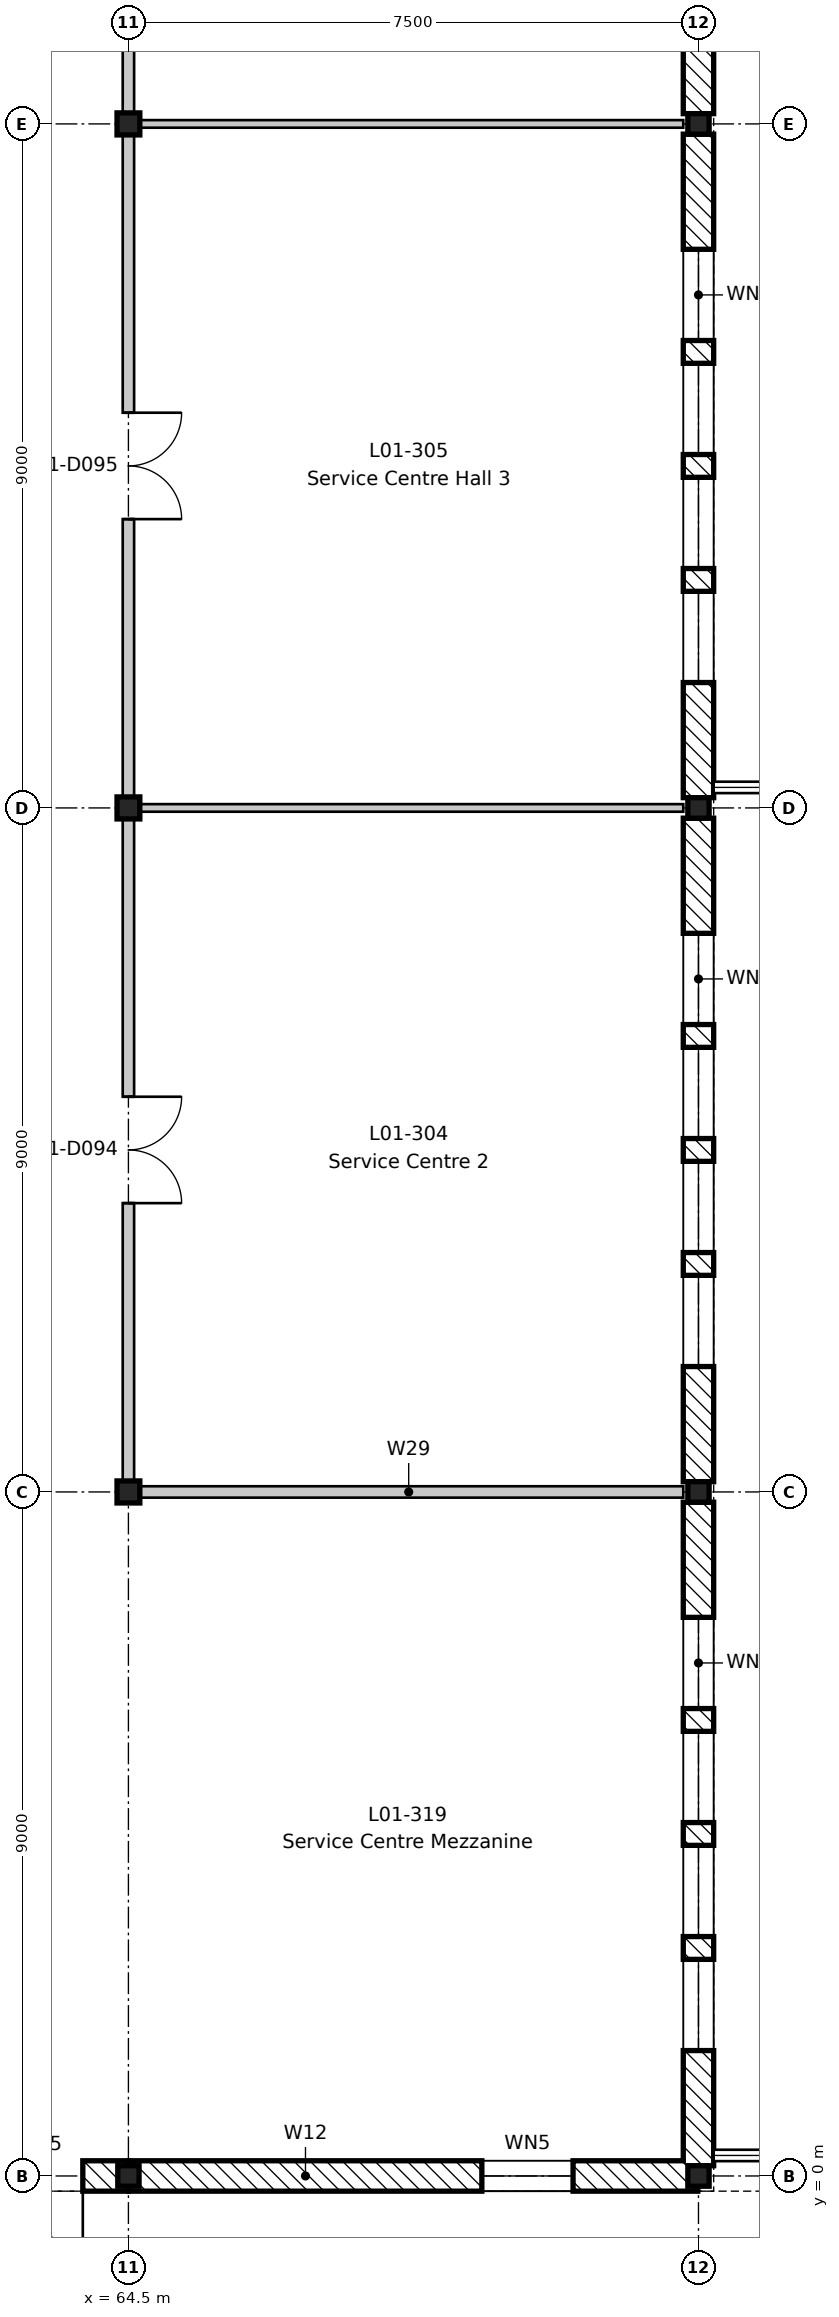
"""IFC4 building model, lengths in metres.
Left out: names, types, materials, properties, quantities, classifications, styles, units other than length and angle.
Written with IfcOpenShell. Run it as: python <this file> out.ifc"""

import sys

from ifc_helpers import new_model, si_unit, direction, frame, frame_2d, origin, origin_2d, place, context, subcontext, project, spatial, rectangle, i_section, extrude, element, fill, save


model = new_model("IFC4")
c1 = context("Model", 3, precision=1e-05, world=origin(), true_north=direction((0.0, 1.0)))
c2 = subcontext(c1, "Body", "Model", "MODEL_VIEW")
j1 = project(units=[si_unit("LENGTHUNIT", "METRE"), si_unit("PLANEANGLEUNIT", "RADIAN")], contexts=[c1])
p1 = place(None, origin())
s1 = spatial("IfcSite", under=j1, at=p1, CompositionType="ELEMENT")
p2 = place(p1, origin())
s2 = spatial("IfcBuilding", under=s1, at=p2, CompositionType="ELEMENT")
p3 = place(p2, frame((0.0, 0.0, 5.4)))
s3 = spatial("IfcBuildingStorey", under=s2, at=p3, CompositionType="ELEMENT", Elevation=5.4)
p4 = place(p3, frame((64.5, 0.0, -0.2), z_axis=(0.0, 0.0, 1.0), x_axis=(1.0, 0.0, 0.0)))
e1 = element("IfcColumn", 1, at=p4, inside=s3, PredefinedType="COLUMN", context=c2, shape_type="SweptSolid", body=[
    extrude(i_section(OverallWidth=0.28, OverallDepth=0.27, WebThickness=0.008, FlangeThickness=0.013, FilletRadius=0.024, at=origin_2d()), origin(), (0.0, 0.0, 1.0), 4.5),
])
for number, where, z_axis, x_axis in (
    (2, (64.5, 9.0, -0.2), (0.0, 0.0, 1.0), (1.0, 0.0, 0.0)),
    (3, (64.5, 18.0, -0.2), (0.0, 0.0, 1.0), (1.0, 0.0, 0.0)),
    (4, (64.5, 27.0, -0.2), (0.0, 0.0, 1.0), (1.0, 0.0, 0.0)),
):
    element("IfcColumn", number, at=place(p3, frame(where, z_axis=z_axis, x_axis=x_axis)), inside=s3, PredefinedType="COLUMN", context=c2, shape_type="SweptSolid", body=[
        extrude(i_section(OverallWidth=0.3, OverallDepth=0.29, WebThickness=0.009, FlangeThickness=0.014, FilletRadius=0.027, at=origin_2d()), origin(), (0.0, 0.0, 1.0), 4.5),
    ])
for number, where, z_axis, x_axis in (
    (5, (72.0, 0.0, -0.2), (0.0, 0.0, 1.0), (1.0, 0.0, 0.0)),
    (6, (72.0, 9.0, -0.2), (0.0, 0.0, 1.0), (1.0, 0.0, 0.0)),
    (7, (72.0, 18.0, -0.2), (0.0, 0.0, 1.0), (1.0, 0.0, 0.0)),
    (8, (72.0, 27.0, -0.2), (0.0, 0.0, 1.0), (1.0, 0.0, 0.0)),
):
    element("IfcColumn", number, at=place(p3, frame(where, z_axis=z_axis, x_axis=x_axis)), inside=s3, PredefinedType="COLUMN", context=c2, shape_type="SweptSolid", body=[
        extrude(i_section(OverallWidth=0.28, OverallDepth=0.27, WebThickness=0.008, FlangeThickness=0.013, FilletRadius=0.024, at=origin_2d()), origin(), (0.0, 0.0, 1.0), 4.5),
    ])
p5 = place(p3, frame((72.0, 8.865, 0.0), z_axis=(0.0, 0.0, 1.0), x_axis=(0.0, -1.0, 0.0)))
e9 = element("IfcWall", 9, at=p5, inside=s3, PredefinedType="STANDARD", context=c2, shape_type="SweptSolid", body=[
    extrude(rectangle(XDim=8.73, YDim=0.4, at=frame_2d((4.365, 0.0))), origin(), (0.0, 0.0, 1.0), 3.9),
])
p6 = place(p5, frame((6.015, 0.0, 0.6)))
e10 = element("IfcOpeningElement", 10, at=p6, cuts=e9, PredefinedType="OPENING", context=c2, shape_type="SweptSolid", body=[
    extrude(rectangle(XDim=1.2, YDim=3.0, at=frame_2d((0.6, 1.5))), frame((0.0, 0.21, 0.0), z_axis=(0.0, -1.0, 0.0), x_axis=(1.0, 0.0, 0.0)), (0.0, 0.0, 1.0), 0.42),
])
p7 = place(p5, frame((4.515, 0.0, 0.6)))
e11 = element("IfcOpeningElement", 11, at=p7, cuts=e9, PredefinedType="OPENING", context=c2, shape_type="SweptSolid", body=[
    extrude(rectangle(XDim=1.2, YDim=3.0, at=frame_2d((0.6, 1.5))), frame((0.0, 0.21, 0.0), z_axis=(0.0, -1.0, 0.0), x_axis=(1.0, 0.0, 0.0)), (0.0, 0.0, 1.0), 0.42),
])
p8 = place(p5, frame((3.015, 0.0, 0.6)))
e12 = element("IfcOpeningElement", 12, at=p8, cuts=e9, PredefinedType="OPENING", context=c2, shape_type="SweptSolid", body=[
    extrude(rectangle(XDim=1.2, YDim=3.0, at=frame_2d((0.6, 1.5))), frame((0.0, 0.21, 0.0), z_axis=(0.0, -1.0, 0.0), x_axis=(1.0, 0.0, 0.0)), (0.0, 0.0, 1.0), 0.42),
])
p9 = place(p5, frame((1.515, 0.0, 0.6)))
e13 = element("IfcOpeningElement", 13, at=p9, cuts=e9, PredefinedType="OPENING", context=c2, shape_type="SweptSolid", body=[
    extrude(rectangle(XDim=1.2, YDim=3.0, at=frame_2d((0.6, 1.5))), frame((0.0, 0.21, 0.0), z_axis=(0.0, -1.0, 0.0), x_axis=(1.0, 0.0, 0.0)), (0.0, 0.0, 1.0), 0.42),
])
p10 = place(p3, frame((72.0, 17.865, 0.0), z_axis=(0.0, 0.0, 1.0), x_axis=(0.0, -1.0, 0.0)))
e14 = element("IfcWall", 14, at=p10, inside=s3, PredefinedType="STANDARD", context=c2, shape_type="SweptSolid", body=[
    extrude(rectangle(XDim=8.73, YDim=0.4, at=frame_2d((4.365, 0.0))), origin(), (0.0, 0.0, 1.0), 3.9),
])
p11 = place(p10, frame((6.015, 0.0, 0.6)))
e15 = element("IfcOpeningElement", 15, at=p11, cuts=e14, PredefinedType="OPENING", context=c2, shape_type="SweptSolid", body=[
    extrude(rectangle(XDim=1.2, YDim=3.0, at=frame_2d((0.6, 1.5))), frame((0.0, 0.21, 0.0), z_axis=(0.0, -1.0, 0.0), x_axis=(1.0, 0.0, 0.0)), (0.0, 0.0, 1.0), 0.42),
])
p12 = place(p10, frame((4.515, 0.0, 0.6)))
e16 = element("IfcOpeningElement", 16, at=p12, cuts=e14, PredefinedType="OPENING", context=c2, shape_type="SweptSolid", body=[
    extrude(rectangle(XDim=1.2, YDim=3.0, at=frame_2d((0.6, 1.5))), frame((0.0, 0.21, 0.0), z_axis=(0.0, -1.0, 0.0), x_axis=(1.0, 0.0, 0.0)), (0.0, 0.0, 1.0), 0.42),
])
p13 = place(p10, frame((3.015, 0.0, 0.6)))
e17 = element("IfcOpeningElement", 17, at=p13, cuts=e14, PredefinedType="OPENING", context=c2, shape_type="SweptSolid", body=[
    extrude(rectangle(XDim=1.2, YDim=3.0, at=frame_2d((0.6, 1.5))), frame((0.0, 0.21, 0.0), z_axis=(0.0, -1.0, 0.0), x_axis=(1.0, 0.0, 0.0)), (0.0, 0.0, 1.0), 0.42),
])
p14 = place(p10, frame((1.515, 0.0, 0.6)))
e18 = element("IfcOpeningElement", 18, at=p14, cuts=e14, PredefinedType="OPENING", context=c2, shape_type="SweptSolid", body=[
    extrude(rectangle(XDim=1.2, YDim=3.0, at=frame_2d((0.6, 1.5))), frame((0.0, 0.21, 0.0), z_axis=(0.0, -1.0, 0.0), x_axis=(1.0, 0.0, 0.0)), (0.0, 0.0, 1.0), 0.42),
])
p15 = place(p3, frame((72.0, 26.865, 0.0), z_axis=(0.0, 0.0, 1.0), x_axis=(0.0, -1.0, 0.0)))
e19 = element("IfcWall", 19, at=p15, inside=s3, PredefinedType="STANDARD", context=c2, shape_type="SweptSolid", body=[
    extrude(rectangle(XDim=8.73, YDim=0.4, at=frame_2d((4.365, 0.0))), origin(), (0.0, 0.0, 1.0), 3.9),
])
p16 = place(p15, frame((6.015, 0.0, 0.6)))
e20 = element("IfcOpeningElement", 20, at=p16, cuts=e19, PredefinedType="OPENING", context=c2, shape_type="SweptSolid", body=[
    extrude(rectangle(XDim=1.2, YDim=3.0, at=frame_2d((0.6, 1.5))), frame((0.0, 0.21, 0.0), z_axis=(0.0, -1.0, 0.0), x_axis=(1.0, 0.0, 0.0)), (0.0, 0.0, 1.0), 0.42),
])
p17 = place(p15, frame((4.515, 0.0, 0.6)))
e21 = element("IfcOpeningElement", 21, at=p17, cuts=e19, PredefinedType="OPENING", context=c2, shape_type="SweptSolid", body=[
    extrude(rectangle(XDim=1.2, YDim=3.0, at=frame_2d((0.6, 1.5))), frame((0.0, 0.21, 0.0), z_axis=(0.0, -1.0, 0.0), x_axis=(1.0, 0.0, 0.0)), (0.0, 0.0, 1.0), 0.42),
])
p18 = place(p15, frame((3.015, 0.0, 0.6)))
e22 = element("IfcOpeningElement", 22, at=p18, cuts=e19, PredefinedType="OPENING", context=c2, shape_type="SweptSolid", body=[
    extrude(rectangle(XDim=1.2, YDim=3.0, at=frame_2d((0.6, 1.5))), frame((0.0, 0.21, 0.0), z_axis=(0.0, -1.0, 0.0), x_axis=(1.0, 0.0, 0.0)), (0.0, 0.0, 1.0), 0.42),
])
p19 = place(p15, frame((1.515, 0.0, 0.6)))
e23 = element("IfcOpeningElement", 23, at=p19, cuts=e19, PredefinedType="OPENING", context=c2, shape_type="SweptSolid", body=[
    extrude(rectangle(XDim=1.2, YDim=3.0, at=frame_2d((0.6, 1.5))), frame((0.0, 0.21, 0.0), z_axis=(0.0, -1.0, 0.0), x_axis=(1.0, 0.0, 0.0)), (0.0, 0.0, 1.0), 0.42),
])
p20 = place(p3, frame((72.0, 35.865, 0.0), z_axis=(0.0, 0.0, 1.0), x_axis=(0.0, -1.0, 0.0)))
e24 = element("IfcWall", 24, at=p20, inside=s3, PredefinedType="STANDARD", context=c2, shape_type="SweptSolid", body=[
    extrude(rectangle(XDim=8.73, YDim=0.4, at=frame_2d((4.365, 0.0))), origin(), (0.0, 0.0, 1.0), 3.9),
])
p21 = place(p20, frame((6.015, 0.0, 0.6)))
e25 = element("IfcOpeningElement", 25, at=p21, cuts=e24, PredefinedType="OPENING", context=c2, shape_type="SweptSolid", body=[
    extrude(rectangle(XDim=1.2, YDim=3.0, at=frame_2d((0.6, 1.5))), frame((0.0, 0.21, 0.0), z_axis=(0.0, -1.0, 0.0), x_axis=(1.0, 0.0, 0.0)), (0.0, 0.0, 1.0), 0.42),
])
p22 = place(p20, frame((4.515, 0.0, 0.6)))
e26 = element("IfcOpeningElement", 26, at=p22, cuts=e24, PredefinedType="OPENING", context=c2, shape_type="SweptSolid", body=[
    extrude(rectangle(XDim=1.2, YDim=3.0, at=frame_2d((0.6, 1.5))), frame((0.0, 0.21, 0.0), z_axis=(0.0, -1.0, 0.0), x_axis=(1.0, 0.0, 0.0)), (0.0, 0.0, 1.0), 0.42),
])
p23 = place(p20, frame((3.015, 0.0, 0.6)))
e27 = element("IfcOpeningElement", 27, at=p23, cuts=e24, PredefinedType="OPENING", context=c2, shape_type="SweptSolid", body=[
    extrude(rectangle(XDim=1.2, YDim=3.0, at=frame_2d((0.6, 1.5))), frame((0.0, 0.21, 0.0), z_axis=(0.0, -1.0, 0.0), x_axis=(1.0, 0.0, 0.0)), (0.0, 0.0, 1.0), 0.42),
])
p24 = place(p20, frame((1.515, 0.0, 0.6)))
e28 = element("IfcOpeningElement", 28, at=p24, cuts=e24, PredefinedType="OPENING", context=c2, shape_type="SweptSolid", body=[
    extrude(rectangle(XDim=1.2, YDim=3.0, at=frame_2d((0.6, 1.5))), frame((0.0, 0.21, 0.0), z_axis=(0.0, -1.0, 0.0), x_axis=(1.0, 0.0, 0.0)), (0.0, 0.0, 1.0), 0.42),
])
p25 = place(p3, frame((64.491, 0.0, 0.0), z_axis=(0.0, 0.0, 1.0), x_axis=(-1.0, 0.0, 0.0)))
e29 = element("IfcWall", 29, at=p25, inside=s3, PredefinedType="STANDARD", context=c2, shape_type="SweptSolid", body=[
    extrude(rectangle(XDim=2.982, YDim=0.4, at=frame_2d((1.491, 0.0))), origin(), (0.0, 0.0, 1.0), 4.1),
])
p26 = place(p25, frame((0.591, 0.0, 0.0)))
e30 = element("IfcOpeningElement", 30, at=p26, cuts=e29, PredefinedType="OPENING", context=c2, shape_type="SweptSolid", body=[
    extrude(rectangle(XDim=1.8, YDim=2.4, at=frame_2d((0.9, 1.2))), frame((0.0, 0.21, 0.0), z_axis=(0.0, -1.0, 0.0), x_axis=(1.0, 0.0, 0.0)), (0.0, 0.0, 1.0), 0.42),
])
p27 = place(p3, frame((71.991, 0.0, 0.0), z_axis=(0.0, 0.0, 1.0), x_axis=(-1.0, 0.0, 0.0)))
e31 = element("IfcWall", 31, at=p27, inside=s3, PredefinedType="STANDARD", context=c2, shape_type="SweptSolid", body=[
    extrude(rectangle(XDim=7.482, YDim=0.4, at=frame_2d((3.741, 0.0))), origin(), (0.0, 0.0, 1.0), 3.97),
])
p28 = place(p27, frame((1.641, 0.0, 0.6)))
e32 = element("IfcOpeningElement", 32, at=p28, cuts=e31, PredefinedType="OPENING", context=c2, shape_type="SweptSolid", body=[
    extrude(rectangle(XDim=1.2, YDim=3.0, at=frame_2d((0.6, 1.5))), frame((0.0, 0.21, 0.0), z_axis=(0.0, -1.0, 0.0), x_axis=(1.0, 0.0, 0.0)), (0.0, 0.0, 1.0), 0.42),
])
p29 = place(p3, frame((64.575, 9.0, 0.0), z_axis=(0.0, 0.0, 1.0), x_axis=(1.0, 0.0, 0.0)))
e33 = element("IfcWall", 33, at=p29, inside=s3, PredefinedType="PARTITIONING", context=c2, shape_type="SweptSolid", body=[
    extrude(rectangle(XDim=7.225, YDim=0.15, at=frame_2d((3.613, 0.0))), origin(), (0.0, 0.0, 1.0), 3.95),
])
for number, where, z_axis, x_axis in (
    (34, (64.575, 18.0, 0.0), (0.0, 0.0, 1.0), (1.0, 0.0, 0.0)),
    (35, (64.575, 27.0, 0.0), (0.0, 0.0, 1.0), (1.0, 0.0, 0.0)),
):
    element("IfcWall", number, at=place(p3, frame(where, z_axis=z_axis, x_axis=x_axis)), inside=s3, PredefinedType="PARTITIONING", context=c2, shape_type="SweptSolid", body=[
        extrude(rectangle(XDim=7.225, YDim=0.1, at=frame_2d((3.613, 0.0))), origin(), (0.0, 0.0, 1.0), 3.95),
    ])
p30 = place(p3, frame((64.5, 9.0, 0.0), z_axis=(0.0, 0.0, 1.0), x_axis=(0.0, 1.0, 0.0)))
e36 = element("IfcWall", 36, at=p30, inside=s3, PredefinedType="PARTITIONING", context=c2, shape_type="SweptSolid", body=[
    extrude(rectangle(XDim=44.8, YDim=0.15, at=frame_2d((22.4, 0.0))), origin(), (0.0, 0.0, 1.0), 3.78),
])
p31 = place(p30, frame((3.8, 0.0, 0.0)))
e37 = element("IfcOpeningElement", 37, at=p31, cuts=e36, PredefinedType="OPENING", context=c2, shape_type="SweptSolid", body=[
    extrude(rectangle(XDim=1.4, YDim=2.1, at=frame_2d((0.7, 1.05))), frame((0.0, 0.085, 0.0), z_axis=(0.0, -1.0, 0.0), x_axis=(1.0, 0.0, 0.0)), (0.0, 0.0, 1.0), 0.17),
])
p32 = place(p30, frame((12.8, 0.0, 0.0)))
e38 = element("IfcOpeningElement", 38, at=p32, cuts=e36, PredefinedType="OPENING", context=c2, shape_type="SweptSolid", body=[
    extrude(rectangle(XDim=1.4, YDim=2.1, at=frame_2d((0.7, 1.05))), frame((0.0, 0.085, 0.0), z_axis=(0.0, -1.0, 0.0), x_axis=(1.0, 0.0, 0.0)), (0.0, 0.0, 1.0), 0.17),
])
p33 = place(p30, frame((21.8, 0.0, 0.0)))
e39 = element("IfcOpeningElement", 39, at=p33, cuts=e36, PredefinedType="OPENING", context=c2, shape_type="SweptSolid", body=[
    extrude(rectangle(XDim=1.4, YDim=2.1, at=frame_2d((0.7, 1.05))), frame((0.0, 0.085, 0.0), z_axis=(0.0, -1.0, 0.0), x_axis=(1.0, 0.0, 0.0)), (0.0, 0.0, 1.0), 0.17),
])
p34 = place(p30, frame((30.8, 0.0, 0.0)))
e40 = element("IfcOpeningElement", 40, at=p34, cuts=e36, PredefinedType="OPENING", context=c2, shape_type="SweptSolid", body=[
    extrude(rectangle(XDim=1.4, YDim=2.1, at=frame_2d((0.7, 1.05))), frame((0.0, 0.085, 0.0), z_axis=(0.0, -1.0, 0.0), x_axis=(1.0, 0.0, 0.0)), (0.0, 0.0, 1.0), 0.17),
])
p35 = place(p30, frame((39.8, 0.0, 0.0)))
e41 = element("IfcOpeningElement", 41, at=p35, cuts=e36, PredefinedType="OPENING", context=c2, shape_type="SweptSolid", body=[
    extrude(rectangle(XDim=1.4, YDim=2.1, at=frame_2d((0.7, 1.05))), frame((0.0, 0.085, 0.0), z_axis=(0.0, -1.0, 0.0), x_axis=(1.0, 0.0, 0.0)), (0.0, 0.0, 1.0), 0.17),
])
p36 = place(p6, origin())
e42 = element("IfcWindow", 42, at=p36, inside=s3, PartitioningType="SINGLE_PANEL", PredefinedType="WINDOW", context=c2, shape_type="SweptSolid", body=[
    extrude(rectangle(XDim=1.2, YDim=3.0, at=frame_2d((0.6, 1.5))), frame((0.0, 0.03, 0.0), z_axis=(0.0, -1.0, 0.0), x_axis=(1.0, 0.0, 0.0)), (0.0, 0.0, 1.0), 0.06),
])
fill(e10, e42)
p37 = place(p7, origin())
e43 = element("IfcWindow", 43, at=p37, inside=s3, PartitioningType="SINGLE_PANEL", PredefinedType="WINDOW", context=c2, shape_type="SweptSolid", body=[
    extrude(rectangle(XDim=1.2, YDim=3.0, at=frame_2d((0.6, 1.5))), frame((0.0, 0.03, 0.0), z_axis=(0.0, -1.0, 0.0), x_axis=(1.0, 0.0, 0.0)), (0.0, 0.0, 1.0), 0.06),
])
fill(e11, e43)
p38 = place(p8, origin())
e44 = element("IfcWindow", 44, at=p38, inside=s3, PartitioningType="SINGLE_PANEL", PredefinedType="WINDOW", context=c2, shape_type="SweptSolid", body=[
    extrude(rectangle(XDim=1.2, YDim=3.0, at=frame_2d((0.6, 1.5))), frame((0.0, 0.03, 0.0), z_axis=(0.0, -1.0, 0.0), x_axis=(1.0, 0.0, 0.0)), (0.0, 0.0, 1.0), 0.06),
])
fill(e12, e44)
p39 = place(p9, origin())
e45 = element("IfcWindow", 45, at=p39, inside=s3, PartitioningType="SINGLE_PANEL", PredefinedType="WINDOW", context=c2, shape_type="SweptSolid", body=[
    extrude(rectangle(XDim=1.2, YDim=3.0, at=frame_2d((0.6, 1.5))), frame((0.0, 0.03, 0.0), z_axis=(0.0, -1.0, 0.0), x_axis=(1.0, 0.0, 0.0)), (0.0, 0.0, 1.0), 0.06),
])
fill(e13, e45)
p40 = place(p11, origin())
e46 = element("IfcWindow", 46, at=p40, inside=s3, PartitioningType="SINGLE_PANEL", PredefinedType="WINDOW", context=c2, shape_type="SweptSolid", body=[
    extrude(rectangle(XDim=1.2, YDim=3.0, at=frame_2d((0.6, 1.5))), frame((0.0, 0.03, 0.0), z_axis=(0.0, -1.0, 0.0), x_axis=(1.0, 0.0, 0.0)), (0.0, 0.0, 1.0), 0.06),
])
fill(e15, e46)
p41 = place(p12, origin())
e47 = element("IfcWindow", 47, at=p41, inside=s3, PartitioningType="SINGLE_PANEL", PredefinedType="WINDOW", context=c2, shape_type="SweptSolid", body=[
    extrude(rectangle(XDim=1.2, YDim=3.0, at=frame_2d((0.6, 1.5))), frame((0.0, 0.03, 0.0), z_axis=(0.0, -1.0, 0.0), x_axis=(1.0, 0.0, 0.0)), (0.0, 0.0, 1.0), 0.06),
])
fill(e16, e47)
p42 = place(p13, origin())
e48 = element("IfcWindow", 48, at=p42, inside=s3, PartitioningType="SINGLE_PANEL", PredefinedType="WINDOW", context=c2, shape_type="SweptSolid", body=[
    extrude(rectangle(XDim=1.2, YDim=3.0, at=frame_2d((0.6, 1.5))), frame((0.0, 0.03, 0.0), z_axis=(0.0, -1.0, 0.0), x_axis=(1.0, 0.0, 0.0)), (0.0, 0.0, 1.0), 0.06),
])
fill(e17, e48)
p43 = place(p14, origin())
e49 = element("IfcWindow", 49, at=p43, inside=s3, PartitioningType="SINGLE_PANEL", PredefinedType="WINDOW", context=c2, shape_type="SweptSolid", body=[
    extrude(rectangle(XDim=1.2, YDim=3.0, at=frame_2d((0.6, 1.5))), frame((0.0, 0.03, 0.0), z_axis=(0.0, -1.0, 0.0), x_axis=(1.0, 0.0, 0.0)), (0.0, 0.0, 1.0), 0.06),
])
fill(e18, e49)
p44 = place(p16, origin())
e50 = element("IfcWindow", 50, at=p44, inside=s3, PartitioningType="SINGLE_PANEL", PredefinedType="WINDOW", context=c2, shape_type="SweptSolid", body=[
    extrude(rectangle(XDim=1.2, YDim=3.0, at=frame_2d((0.6, 1.5))), frame((0.0, 0.03, 0.0), z_axis=(0.0, -1.0, 0.0), x_axis=(1.0, 0.0, 0.0)), (0.0, 0.0, 1.0), 0.06),
])
fill(e20, e50)
p45 = place(p17, origin())
e51 = element("IfcWindow", 51, at=p45, inside=s3, PartitioningType="SINGLE_PANEL", PredefinedType="WINDOW", context=c2, shape_type="SweptSolid", body=[
    extrude(rectangle(XDim=1.2, YDim=3.0, at=frame_2d((0.6, 1.5))), frame((0.0, 0.03, 0.0), z_axis=(0.0, -1.0, 0.0), x_axis=(1.0, 0.0, 0.0)), (0.0, 0.0, 1.0), 0.06),
])
fill(e21, e51)
p46 = place(p18, origin())
e52 = element("IfcWindow", 52, at=p46, inside=s3, PartitioningType="SINGLE_PANEL", PredefinedType="WINDOW", context=c2, shape_type="SweptSolid", body=[
    extrude(rectangle(XDim=1.2, YDim=3.0, at=frame_2d((0.6, 1.5))), frame((0.0, 0.03, 0.0), z_axis=(0.0, -1.0, 0.0), x_axis=(1.0, 0.0, 0.0)), (0.0, 0.0, 1.0), 0.06),
])
fill(e22, e52)
p47 = place(p19, origin())
e53 = element("IfcWindow", 53, at=p47, inside=s3, PartitioningType="SINGLE_PANEL", PredefinedType="WINDOW", context=c2, shape_type="SweptSolid", body=[
    extrude(rectangle(XDim=1.2, YDim=3.0, at=frame_2d((0.6, 1.5))), frame((0.0, 0.03, 0.0), z_axis=(0.0, -1.0, 0.0), x_axis=(1.0, 0.0, 0.0)), (0.0, 0.0, 1.0), 0.06),
])
fill(e23, e53)
p48 = place(p26, origin())
e54 = element("IfcDoor", 54, at=p48, inside=s3, OperationType="DOUBLE_DOOR_SINGLE_SWING", PredefinedType="DOOR", context=c2, shape_type="SweptSolid", body=[
    extrude(rectangle(XDim=1.8, YDim=2.4, at=frame_2d((0.9, 1.2))), frame((0.0, 0.025, 0.0), z_axis=(0.0, -1.0, 0.0), x_axis=(1.0, 0.0, 0.0)), (0.0, 0.0, 1.0), 0.05),
])
fill(e30, e54)
p49 = place(p28, origin())
e55 = element("IfcWindow", 55, at=p49, inside=s3, PartitioningType="SINGLE_PANEL", PredefinedType="WINDOW", context=c2, shape_type="SweptSolid", body=[
    extrude(rectangle(XDim=1.2, YDim=3.0, at=frame_2d((0.6, 1.5))), frame((0.0, 0.03, 0.0), z_axis=(0.0, -1.0, 0.0), x_axis=(1.0, 0.0, 0.0)), (0.0, 0.0, 1.0), 0.06),
])
fill(e32, e55)
p50 = place(p31, frame((1.4, 0.0, 0.0), z_axis=(0.0, 0.0, 1.0), x_axis=(-1.0, 0.0, 0.0)))
e56 = element("IfcDoor", 56, at=p50, inside=s3, OperationType="DOUBLE_DOOR_SINGLE_SWING", PredefinedType="DOOR", context=c2, shape_type="SweptSolid", body=[
    extrude(rectangle(XDim=1.4, YDim=2.1, at=frame_2d((0.7, 1.05))), frame((0.0, 0.025, 0.0), z_axis=(0.0, -1.0, 0.0), x_axis=(1.0, 0.0, 0.0)), (0.0, 0.0, 1.0), 0.05),
])
fill(e37, e56)
p51 = place(p32, frame((1.4, 0.0, 0.0), z_axis=(0.0, 0.0, 1.0), x_axis=(-1.0, 0.0, 0.0)))
e57 = element("IfcDoor", 57, at=p51, inside=s3, OperationType="DOUBLE_DOOR_SINGLE_SWING", PredefinedType="DOOR", context=c2, shape_type="SweptSolid", body=[
    extrude(rectangle(XDim=1.4, YDim=2.1, at=frame_2d((0.7, 1.05))), frame((0.0, 0.025, 0.0), z_axis=(0.0, -1.0, 0.0), x_axis=(1.0, 0.0, 0.0)), (0.0, 0.0, 1.0), 0.05),
])
fill(e38, e57)
save(model, sys.argv[1])
